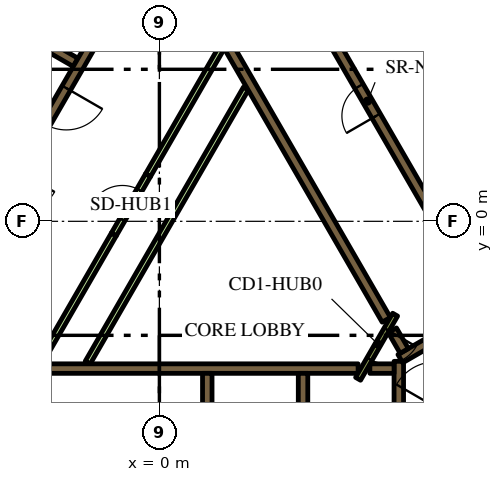
"""IFC4 building model, lengths in metres.
Left out: names, types, materials, properties, quantities, classifications, styles, units other than length and angle.
Written with IfcOpenShell. Run it as: python <this file> out.ifc"""

import sys

from ifc_helpers import new_model, si_unit, direction, frame, frame_2d, origin, place, context, subcontext, project, spatial, rectangle, extrude, element, fill, save


model = new_model("IFC4")
c1 = context("Model", 3, precision=1e-05, world=origin(), true_north=direction((0.0, 1.0)))
c2 = subcontext(c1, "Body", "Model", "MODEL_VIEW")
j1 = project(units=[si_unit("LENGTHUNIT", "METRE"), si_unit("PLANEANGLEUNIT", "RADIAN")], contexts=[c1])
p1 = place(None, origin())
s1 = spatial("IfcSite", under=j1, at=p1, CompositionType="ELEMENT")
p2 = place(p1, origin())
s2 = spatial("IfcBuilding", under=s1, at=p2, CompositionType="ELEMENT")
p3 = place(p2, frame((0.0, 0.0, 74.4)))
s3 = spatial("IfcBuildingStorey", under=s2, at=p3, CompositionType="ELEMENT", Elevation=74.4)
p4 = place(p3, frame((6.461, 13.909, 0.0), z_axis=(0.0, 0.0, 1.0), x_axis=(0.500005804227, -0.866022052686, 0.0)))
e1 = element("IfcWall", 1, at=p4, inside=s3, PredefinedType="SOLIDWALL", context=c2, shape_type="SweptSolid", body=[
    extrude(rectangle(XDim=20.834, YDim=0.9, at=frame_2d((10.417, 0.0))), origin(), (0.0, 0.0, 1.0), 3.9),
])
p5 = place(p3, frame((-5.259, -3.875, 0.0), z_axis=(0.0, 0.0, 1.0), x_axis=(1.0, 0.0, 0.0)))
e2 = element("IfcWall", 2, at=p5, inside=s3, PredefinedType="SOLIDWALL", context=c2, shape_type="SweptSolid", body=[
    extrude(rectangle(XDim=10.489, YDim=0.25, at=frame_2d((5.244, 0.0))), origin(), (0.0, 0.0, 1.0), 3.9),
])
for number, where, z_axis, x_axis in (
    (3, (3.78, -4.0, 0.0), (0.0, 0.0, 1.0), (0.0, -1.0, 0.0)),
    (4, (1.26, -4.0, 0.0), (0.0, 0.0, 1.0), (0.0, -1.0, 0.0)),
):
    element("IfcWall", number, at=place(p3, frame(where, z_axis=z_axis, x_axis=x_axis)), inside=s3, PredefinedType="SOLIDWALL", context=c2, shape_type="SweptSolid", body=[
        extrude(rectangle(XDim=2.2, YDim=0.25, at=frame_2d((1.1, 0.0))), origin(), (0.0, 0.0, 1.0), 3.9),
    ])
p6 = place(p3, frame((6.3, -7.27, 0.0), z_axis=(0.0, 0.0, 1.0), x_axis=(0.0, 1.0, 0.0)))
e5 = element("IfcWall", 5, at=p6, inside=s3, PredefinedType="SOLIDWALL", context=c2, shape_type="SweptSolid", body=[
    extrude(rectangle(XDim=3.586, YDim=0.25, at=frame_2d((1.793, 0.0))), origin(), (0.0, 0.0, 1.0), 3.9),
])
p7 = place(p3, frame((5.538, -3.875, 0.0), z_axis=(0.0, 0.0, 1.0), x_axis=(1.0, 0.0, 0.0)))
e6 = element("IfcWall", 6, at=p7, inside=s3, PredefinedType="SOLIDWALL", context=c2, shape_type="SweptSolid", body=[
    extrude(rectangle(XDim=0.637, YDim=0.25, at=frame_2d((0.318, 0.0))), origin(), (0.0, 0.0, 1.0), 3.9),
])
p8 = place(p3, frame((9.346, -1.879, 0.0), z_axis=(0.0, 0.0, 1.0), x_axis=(-0.866048528039, -0.499959945477, 0.0)))
e7 = element("IfcWall", 7, at=p8, inside=s3, PredefinedType="SOLIDWALL", context=c2, shape_type="SweptSolid", body=[
    extrude(rectangle(XDim=3.47, YDim=0.25, at=frame_2d((1.735, 0.0))), origin(), (0.0, 0.0, 1.0), 3.9),
])
p9 = place(p3, frame((6.13, -2.867, 0.0), z_axis=(0.0, 0.0, 1.0), x_axis=(0.500160776593, -0.865932559475, 0.0)))
e8 = element("IfcWall", 8, at=p9, inside=s3, PredefinedType="SOLIDWALL", context=c2, shape_type="SweptSolid", body=[
    extrude(rectangle(XDim=0.627, YDim=0.25, at=frame_2d((0.313, 0.0))), origin(), (0.0, 0.0, 1.0), 3.9),
])
p10 = place(p3, frame((5.97, -2.591, 0.0), z_axis=(0.0, 0.0, 1.0), x_axis=(-0.499994469932, 0.866028596547, 0.0)))
e9 = element("IfcWall", 9, at=p10, inside=s3, PredefinedType="SOLIDWALL", context=c2, shape_type="SweptSolid", body=[
    extrude(rectangle(XDim=10.488, YDim=0.25, at=frame_2d((5.244, 0.0))), origin(), (0.0, 0.0, 1.0), 3.9),
])
p11 = place(p3, frame((-8.06, -1.311, 0.0), z_axis=(0.0, 0.0, 1.0), x_axis=(0.50000273126, 0.866023826885, 0.0)))
e10 = element("IfcWall", 10, at=p11, inside=s3, PredefinedType="SOLIDWALL", context=c2, shape_type="SweptSolid", body=[
    extrude(rectangle(XDim=10.33, YDim=0.25, at=frame_2d((5.165, 0.0))), origin(), (0.0, 0.0, 1.0), 3.9),
])
p12 = place(p3, frame((-2.204, 4.182, 0.0), z_axis=(0.0, 0.0, 1.0), x_axis=(-0.866008176907, 0.50002983664, 0.0)))
e11 = element("IfcWall", 11, at=p12, inside=s3, PredefinedType="SOLIDWALL", context=c2, shape_type="SweptSolid", body=[
    extrude(rectangle(XDim=2.2, YDim=0.25, at=frame_2d((1.1, 0.0))), origin(), (0.0, 0.0, 1.0), 3.9),
])
p13 = place(p3, frame((-3.147, -3.718, 0.0), z_axis=(0.0, 0.0, 1.0), x_axis=(0.500010131483, 0.866019554291, 0.0)))
e12 = element("IfcWall", 12, at=p13, inside=s3, PredefinedType="PARTITIONING", context=c2, shape_type="SweptSolid", body=[
    extrude(rectangle(XDim=3.894, YDim=0.15, at=frame_2d((1.947, 0.0))), origin(), (0.0, 0.0, 1.0), 2.7),
])
p14 = place(p3, frame((-1.887, -3.718, 0.0), z_axis=(0.0, 0.0, 1.0), x_axis=(0.500005008002, 0.866022512394, 0.0)))
e13 = element("IfcWall", 13, at=p14, inside=s3, PredefinedType="PARTITIONING", context=c2, shape_type="SweptSolid", body=[
    extrude(rectangle(XDim=8.327, YDim=0.15, at=frame_2d((4.164, 0.0))), origin(), (0.0, 0.0, 1.0), 2.7),
])
p15 = place(p3, frame((-0.3, 1.212, 0.0), z_axis=(0.0, 0.0, 1.0), x_axis=(0.499963101113, 0.866046706318, 0.0)))
e14 = element("IfcWall", 14, at=p15, inside=s3, PredefinedType="PARTITIONING", context=c2, shape_type="SweptSolid", body=[
    extrude(rectangle(XDim=3.893, YDim=0.15, at=frame_2d((1.947, 0.0))), origin(), (0.0, 0.0, 1.0), 2.7),
])
p16 = place(p3, frame((11.553, -0.46, 0.0), z_axis=(0.0, 0.0, 1.0), x_axis=(-0.500006514828, 0.866021642414, 0.0)))
e15 = element("IfcWall", 15, at=p16, inside=s3, PredefinedType="SOLIDWALL", context=c2, shape_type="SweptSolid", body=[
    extrude(rectangle(XDim=12.35, YDim=0.25, at=frame_2d((6.175, 0.0))), origin(), (0.0, 0.0, 1.0), 3.9),
])
p17 = place(p16, frame((0.585, 0.0, 0.0)))
e16 = element("IfcOpeningElement", 16, at=p17, cuts=e15, PredefinedType="OPENING", context=c2, shape_type="SweptSolid", body=[
    extrude(rectangle(XDim=1.1, YDim=2.1, at=frame_2d((0.55, 1.05))), frame((0.0, 0.135, 0.0), z_axis=(0.0, -1.0, 0.0), x_axis=(1.0, 0.0, 0.0)), (0.0, 0.0, 1.0), 0.27),
])
p18 = place(p16, frame((3.105, 0.0, 0.0)))
e17 = element("IfcOpeningElement", 17, at=p18, cuts=e15, PredefinedType="OPENING", context=c2, shape_type="SweptSolid", body=[
    extrude(rectangle(XDim=1.1, YDim=2.1, at=frame_2d((0.55, 1.05))), frame((0.0, 0.135, 0.0), z_axis=(0.0, -1.0, 0.0), x_axis=(1.0, 0.0, 0.0)), (0.0, 0.0, 1.0), 0.27),
])
p19 = place(p16, frame((5.625, 0.0, 0.0)))
e18 = element("IfcOpeningElement", 18, at=p19, cuts=e15, PredefinedType="OPENING", context=c2, shape_type="SweptSolid", body=[
    extrude(rectangle(XDim=1.1, YDim=2.1, at=frame_2d((0.55, 1.05))), frame((0.0, 0.135, 0.0), z_axis=(0.0, -1.0, 0.0), x_axis=(1.0, 0.0, 0.0)), (0.0, 0.0, 1.0), 0.27),
])
p20 = place(p3, frame((8.565, -2.185, 0.0), z_axis=(0.0, 0.0, 1.0), x_axis=(-0.499997954832, 0.866026584559, 0.0)))
e19 = element("IfcWall", 19, at=p20, inside=s3, PredefinedType="SOLIDWALL", context=c2, shape_type="SweptSolid", body=[
    extrude(rectangle(XDim=12.35, YDim=0.25, at=frame_2d((6.175, 0.0))), origin(), (0.0, 0.0, 1.0), 3.9),
])
p21 = place(p20, frame((5.725, 0.0, 0.0)))
e20 = element("IfcOpeningElement", 20, at=p21, cuts=e19, PredefinedType="OPENING", context=c2, shape_type="SweptSolid", body=[
    extrude(rectangle(XDim=0.9, YDim=2.1, at=frame_2d((0.45, 1.05))), frame((0.0, 0.135, 0.0), z_axis=(0.0, -1.0, 0.0), x_axis=(1.0, 0.0, 0.0)), (0.0, 0.0, 1.0), 0.27),
])
p22 = place(p3, frame((-0.898, 6.194, 0.0), z_axis=(0.0, 0.0, 1.0), x_axis=(-0.499996202215, -0.866027596426, 0.0)))
e21 = element("IfcWall", 21, at=p22, inside=s3, PredefinedType="SOLIDWALL", context=c2, shape_type="SweptSolid", body=[
    extrude(rectangle(XDim=9.83, YDim=0.25, at=frame_2d((4.915, 0.0))), origin(), (0.0, 0.0, 1.0), 3.9),
])
p23 = place(p22, frame((0.585, 0.0, 0.0)))
e22 = element("IfcOpeningElement", 22, at=p23, cuts=e21, PredefinedType="OPENING", context=c2, shape_type="SweptSolid", body=[
    extrude(rectangle(XDim=1.1, YDim=2.1, at=frame_2d((0.55, 1.05))), frame((0.0, 0.135, 0.0), z_axis=(0.0, -1.0, 0.0), x_axis=(1.0, 0.0, 0.0)), (0.0, 0.0, 1.0), 0.27),
])
p24 = place(p22, frame((3.105, 0.0, 0.0)))
e23 = element("IfcOpeningElement", 23, at=p24, cuts=e21, PredefinedType="OPENING", context=c2, shape_type="SweptSolid", body=[
    extrude(rectangle(XDim=1.1, YDim=2.1, at=frame_2d((0.55, 1.05))), frame((0.0, 0.135, 0.0), z_axis=(0.0, -1.0, 0.0), x_axis=(1.0, 0.0, 0.0)), (0.0, 0.0, 1.0), 0.27),
])
p25 = place(p22, frame((5.625, 0.0, 0.0)))
e24 = element("IfcOpeningElement", 24, at=p25, cuts=e21, PredefinedType="OPENING", context=c2, shape_type="SweptSolid", body=[
    extrude(rectangle(XDim=1.1, YDim=2.1, at=frame_2d((0.55, 1.05))), frame((0.0, 0.135, 0.0), z_axis=(0.0, -1.0, 0.0), x_axis=(1.0, 0.0, 0.0)), (0.0, 0.0, 1.0), 0.27),
])
p26 = place(p22, frame((8.145, 0.0, 0.0)))
e25 = element("IfcOpeningElement", 25, at=p26, cuts=e21, PredefinedType="OPENING", context=c2, shape_type="SweptSolid", body=[
    extrude(rectangle(XDim=1.1, YDim=2.1, at=frame_2d((0.55, 1.05))), frame((0.0, 0.135, 0.0), z_axis=(0.0, -1.0, 0.0), x_axis=(1.0, 0.0, 0.0)), (0.0, 0.0, 1.0), 0.27),
])
p27 = place(p3, frame((7.053, -5.284, 0.0), z_axis=(0.0, 0.0, 1.0), x_axis=(0.500078061341, 0.865980330357, 0.0)))
e26 = element("IfcWall", 26, at=p27, inside=s3, PredefinedType="SOLIDWALL", context=c2, shape_type="SweptSolid", body=[
    extrude(rectangle(XDim=2.1, YDim=0.4, at=frame_2d((1.05, 0.0))), origin(), (0.0, 0.0, 1.0), 3.9),
])
p28 = place(p27, frame((0.45, 0.0, 0.0)))
e27 = element("IfcOpeningElement", 27, at=p28, cuts=e26, PredefinedType="OPENING", context=c2, shape_type="SweptSolid", body=[
    extrude(rectangle(XDim=1.2, YDim=2.1, at=frame_2d((0.6, 1.05))), frame((0.0, 0.21, 0.0), z_axis=(0.0, -1.0, 0.0), x_axis=(1.0, 0.0, 0.0)), (0.0, 0.0, 1.0), 0.42),
])
p29 = place(p3, frame((6.203, -2.456, 0.0), z_axis=(0.0, 0.0, 1.0), x_axis=(-0.500043961785, -0.866000020948, 0.0)))
e28 = element("IfcWall", 28, at=p29, inside=s3, PredefinedType="PARTITIONING", context=c2, shape_type="SweptSolid", body=[
    extrude(rectangle(XDim=1.95, YDim=0.15, at=frame_2d((0.975, 0.0))), origin(), (0.0, 0.0, 1.0), 3.9),
])
p30 = place(p29, frame((0.45, 0.0, 0.0)))
e29 = element("IfcOpeningElement", 29, at=p30, cuts=e28, PredefinedType="OPENING", context=c2, shape_type="SweptSolid", body=[
    extrude(rectangle(XDim=0.9, YDim=2.1, at=frame_2d((0.45, 1.05))), frame((0.0, 0.085, 0.0), z_axis=(0.0, -1.0, 0.0), x_axis=(1.0, 0.0, 0.0)), (0.0, 0.0, 1.0), 0.17),
])
p31 = place(p3, frame((-1.2, -0.346, 0.0), z_axis=(0.0, 0.0, 1.0), x_axis=(0.499961193289, 0.866047807691, 0.0)))
e30 = element("IfcWall", 30, at=p31, inside=s3, PredefinedType="PARTITIONING", context=c2, shape_type="SweptSolid", body=[
    extrude(rectangle(XDim=1.8, YDim=0.15, at=frame_2d((0.9, 0.0))), origin(), (0.0, 0.0, 1.0), 2.7),
])
p32 = place(p31, frame((0.45, 0.0, 0.0)))
e31 = element("IfcOpeningElement", 31, at=p32, cuts=e30, PredefinedType="OPENING", context=c2, shape_type="SweptSolid", body=[
    extrude(rectangle(XDim=0.9, YDim=2.1, at=frame_2d((0.45, 1.05))), frame((0.0, 0.085, 0.0), z_axis=(0.0, -1.0, 0.0), x_axis=(1.0, 0.0, 0.0)), (0.0, 0.0, 1.0), 0.17),
])
p33 = place(p3, frame((6.163, 18.475, 0.0), z_axis=(0.0, 0.0, 1.0), x_axis=(0.500001317485, -0.866024643133, 0.0)))
e32 = element("IfcWall", 32, at=p33, inside=s3, PredefinedType="PARTITIONING", context=c2, shape_type="SweptSolid", body=[
    extrude(rectangle(XDim=25.767, YDim=0.15, at=frame_2d((12.883, 0.0))), origin(), (0.0, 0.0, 1.0), 2.7),
])
p34 = place(p33, frame((21.953, 0.0, 0.0)))
e33 = element("IfcOpeningElement", 33, at=p34, cuts=e32, PredefinedType="OPENING", context=c2, shape_type="SweptSolid", body=[
    extrude(rectangle(XDim=1.0, YDim=2.1, at=frame_2d((0.5, 1.05))), frame((0.0, 0.085, 0.0), z_axis=(0.0, -1.0, 0.0), x_axis=(1.0, 0.0, 0.0)), (0.0, 0.0, 1.0), 0.17),
])
p35 = place(p33, frame((9.948, 0.0, 0.0)))
e34 = element("IfcOpeningElement", 34, at=p35, cuts=e32, PredefinedType="OPENING", context=c2, shape_type="SweptSolid", body=[
    extrude(rectangle(XDim=1.0, YDim=2.1, at=frame_2d((0.5, 1.05))), frame((0.0, 0.085, 0.0), z_axis=(0.0, -1.0, 0.0), x_axis=(1.0, 0.0, 0.0)), (0.0, 0.0, 1.0), 0.17),
])
p36 = place(p33, frame((8.641, 0.0, 0.0)))
e35 = element("IfcOpeningElement", 35, at=p36, cuts=e32, PredefinedType="OPENING", context=c2, shape_type="SweptSolid", body=[
    extrude(rectangle(XDim=1.0, YDim=2.1, at=frame_2d((0.5, 1.05))), frame((0.0, 0.085, 0.0), z_axis=(0.0, -1.0, 0.0), x_axis=(1.0, 0.0, 0.0)), (0.0, 0.0, 1.0), 0.17),
])
p37 = place(p21, origin())
e36 = element("IfcDoor", 36, at=p37, inside=s3, OperationType="SINGLE_SWING_LEFT", PredefinedType="DOOR", context=c2, shape_type="SweptSolid", body=[
    extrude(rectangle(XDim=0.9, YDim=2.1, at=frame_2d((0.45, 1.05))), frame((0.0, 0.025, 0.0), z_axis=(0.0, -1.0, 0.0), x_axis=(1.0, 0.0, 0.0)), (0.0, 0.0, 1.0), 0.05),
])
fill(e20, e36)
p38 = place(p24, origin())
e37 = element("IfcDoor", 37, at=p38, inside=s3, OperationType="DOUBLE_DOOR_SLIDING", PredefinedType="DOOR", context=c2, shape_type="SweptSolid", body=[
    extrude(rectangle(XDim=1.1, YDim=2.1, at=frame_2d((0.55, 1.05))), frame((0.0, 0.025, 0.0), z_axis=(0.0, -1.0, 0.0), x_axis=(1.0, 0.0, 0.0)), (0.0, 0.0, 1.0), 0.05),
])
fill(e23, e37)
p39 = place(p30, origin())
e38 = element("IfcDoor", 38, at=p39, inside=s3, OperationType="SINGLE_SWING_LEFT", PredefinedType="DOOR", context=c2, shape_type="SweptSolid", body=[
    extrude(rectangle(XDim=0.9, YDim=2.1, at=frame_2d((0.45, 1.05))), frame((0.0, 0.025, 0.0), z_axis=(0.0, -1.0, 0.0), x_axis=(1.0, 0.0, 0.0)), (0.0, 0.0, 1.0), 0.05),
])
fill(e29, e38)
p40 = place(p32, origin())
e39 = element("IfcDoor", 39, at=p40, inside=s3, OperationType="SINGLE_SWING_LEFT", PredefinedType="DOOR", context=c2, shape_type="SweptSolid", body=[
    extrude(rectangle(XDim=0.9, YDim=2.1, at=frame_2d((0.45, 1.05))), frame((0.0, 0.025, 0.0), z_axis=(0.0, -1.0, 0.0), x_axis=(1.0, 0.0, 0.0)), (0.0, 0.0, 1.0), 0.05),
])
fill(e31, e39)
save(model, sys.argv[1])
